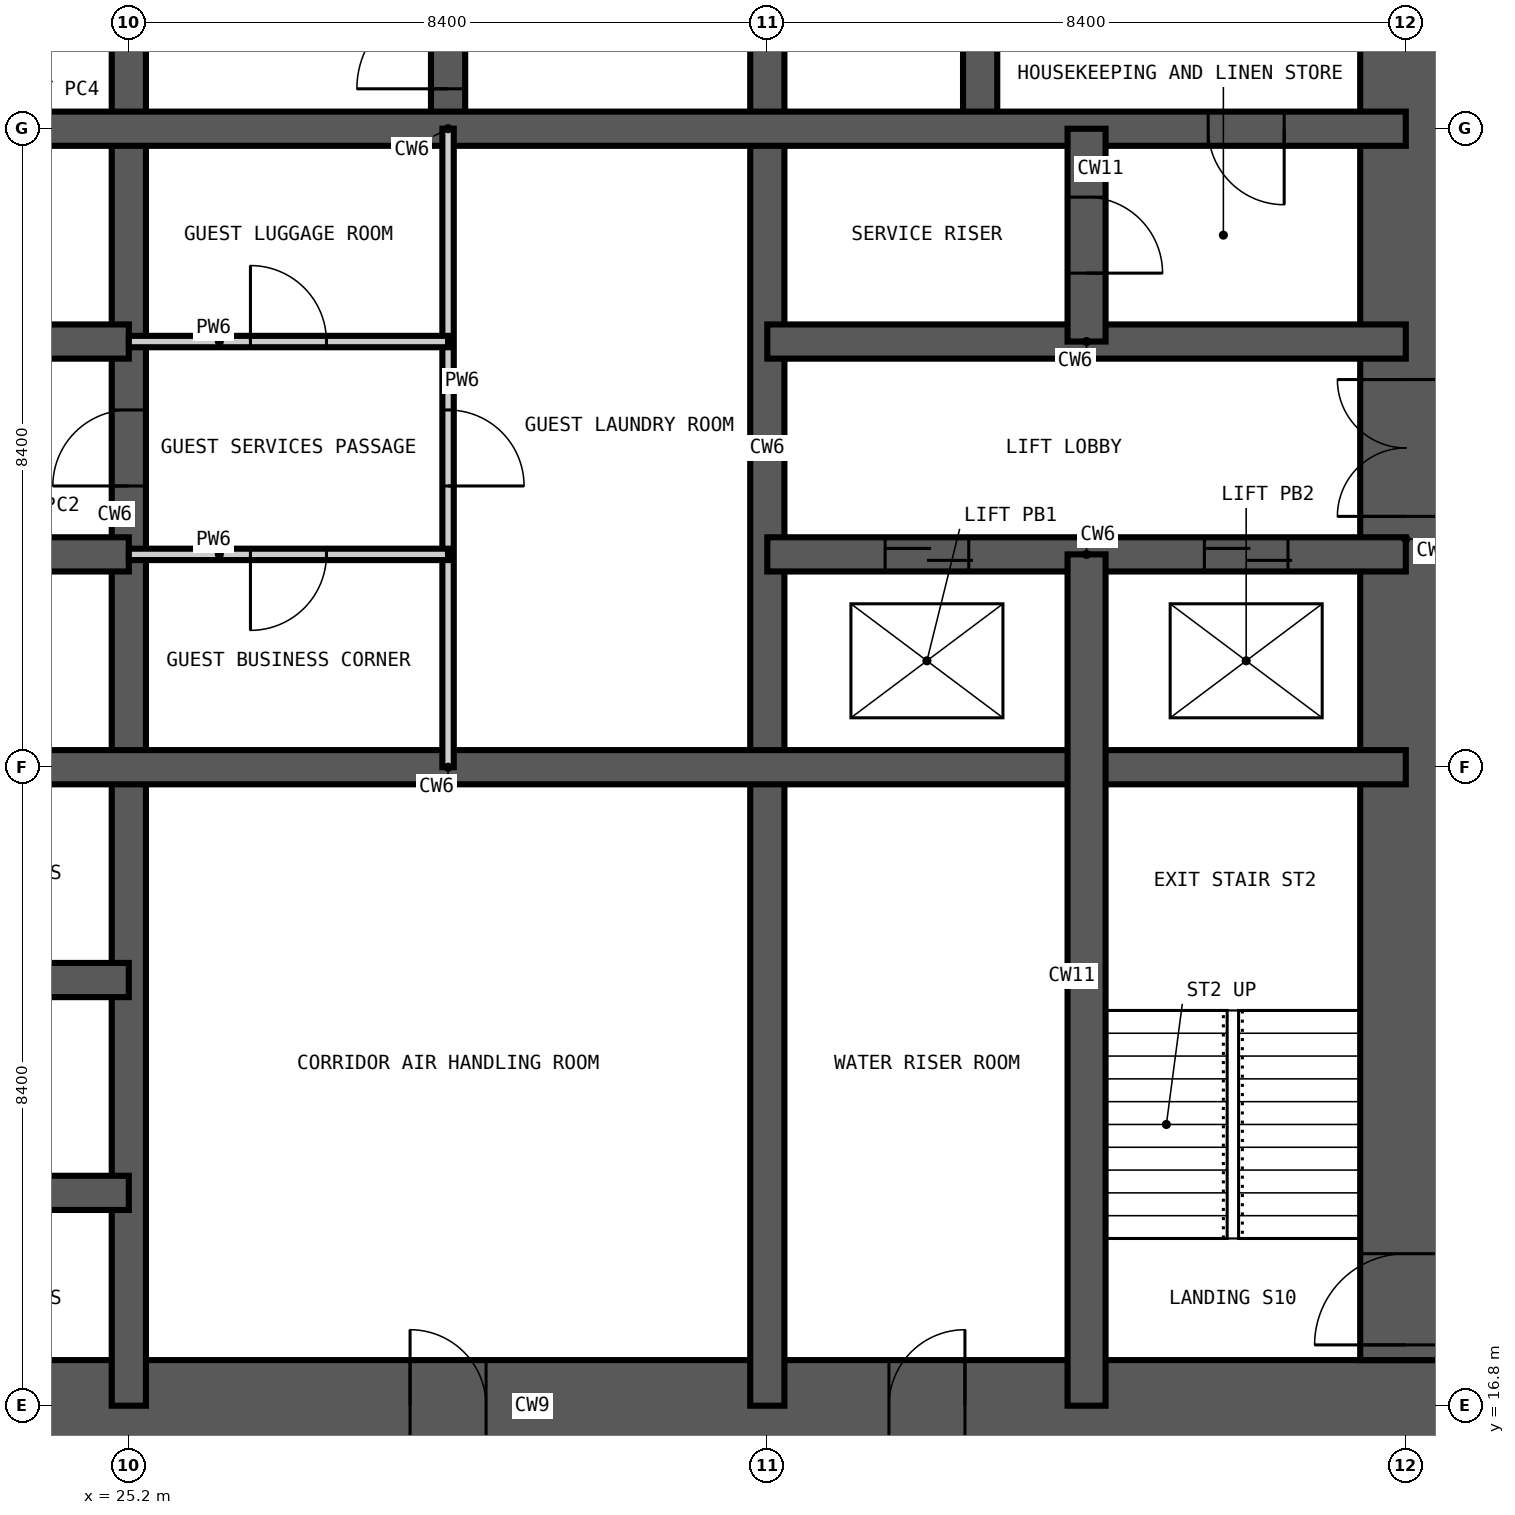
"""IFC4 building model, lengths in metres.
Left out: names, types, materials, properties, quantities, classifications, styles, units other than length and angle.
Written with IfcOpenShell. Run it as: python <this file> out.ifc"""

import sys

from ifc_helpers import new_model, si_unit, direction, frame, frame_2d, origin, place, context, subcontext, project, spatial, rectangle, extrude, element, fill, save


model = new_model("IFC4")
c1 = context("Model", 3, precision=1e-05, world=origin(), true_north=direction((0.0, 1.0)))
c2 = subcontext(c1, "Body", "Model", "MODEL_VIEW")
j1 = project(units=[si_unit("LENGTHUNIT", "METRE"), si_unit("PLANEANGLEUNIT", "RADIAN")], contexts=[c1])
p1 = place(None, origin())
s1 = spatial("IfcSite", under=j1, at=p1, CompositionType="ELEMENT")
p2 = place(p1, origin())
s2 = spatial("IfcBuilding", under=s1, at=p2, CompositionType="ELEMENT")
p3 = place(p2, frame((0.0, 0.0, 97.2)))
s3 = spatial("IfcBuildingStorey", under=s2, at=p3, CompositionType="ELEMENT", Elevation=97.2)
p4 = place(p3, frame((16.2, 16.8, -0.35), z_axis=(0.0, 0.0, 1.0), x_axis=(1.0, 0.0, 0.0)))
e1 = element("IfcWall", 1, at=p4, inside=s3, PredefinedType="SHEAR", context=c2, shape_type="SweptSolid", body=[
    extrude(rectangle(XDim=26.4, YDim=1.2, at=frame_2d((13.2, 0.0))), origin(), (0.0, 0.0, 1.0), 3.6),
])
p5 = place(p4, frame((12.7, 0.0, 0.35)))
e2 = element("IfcOpeningElement", 2, at=p5, cuts=e1, PredefinedType="OPENING", context=c2, shape_type="SweptSolid", body=[
    extrude(rectangle(XDim=1.0, YDim=2.1, at=frame_2d((0.5, 1.05))), frame((0.0, 0.61, 0.0), z_axis=(0.0, -1.0, 0.0), x_axis=(1.0, 0.0, 0.0)), (0.0, 0.0, 1.0), 1.22),
])
p6 = place(p4, frame((19.0, 0.0, 0.35)))
e3 = element("IfcOpeningElement", 3, at=p6, cuts=e1, PredefinedType="OPENING", context=c2, shape_type="SweptSolid", body=[
    extrude(rectangle(XDim=1.0, YDim=2.1, at=frame_2d((0.5, 1.05))), frame((0.0, 0.61, 0.0), z_axis=(0.0, -1.0, 0.0), x_axis=(1.0, 0.0, 0.0)), (0.0, 0.0, 1.0), 1.22),
])
p7 = place(p3, frame((42.0, 17.4, -0.35), z_axis=(0.0, 0.0, 1.0), x_axis=(0.0, 1.0, 0.0)))
e4 = element("IfcWall", 4, at=p7, inside=s3, PredefinedType="SHEAR", context=c2, shape_type="SweptSolid", body=[
    extrude(rectangle(XDim=24.0, YDim=1.2, at=frame_2d((12.0, 0.0))), origin(), (0.0, 0.0, 1.0), 3.6),
])
p8 = place(p7, frame((0.2, 0.0, 0.35)))
e5 = element("IfcOpeningElement", 5, at=p8, cuts=e4, PredefinedType="OPENING", context=c2, shape_type="SweptSolid", body=[
    extrude(rectangle(XDim=1.2, YDim=2.2, at=frame_2d((0.6, 1.1))), frame((0.0, 0.61, 0.0), z_axis=(0.0, -1.0, 0.0), x_axis=(1.0, 0.0, 0.0)), (0.0, 0.0, 1.0), 1.22),
])
p9 = place(p7, frame((11.1, 0.0, 0.35)))
e6 = element("IfcOpeningElement", 6, at=p9, cuts=e4, PredefinedType="OPENING", context=c2, shape_type="SweptSolid", body=[
    extrude(rectangle(XDim=1.8, YDim=2.2, at=frame_2d((0.9, 1.1))), frame((0.0, 0.61, 0.0), z_axis=(0.0, -1.0, 0.0), x_axis=(1.0, 0.0, 0.0)), (0.0, 0.0, 1.0), 1.22),
])
p10 = place(p7, frame((19.9, 0.0, 0.35)))
e7 = element("IfcOpeningElement", 7, at=p10, cuts=e4, PredefinedType="OPENING", context=c2, shape_type="SweptSolid", body=[
    extrude(rectangle(XDim=1.0, YDim=2.1, at=frame_2d((0.5, 1.05))), frame((0.0, 0.61, 0.0), z_axis=(0.0, -1.0, 0.0), x_axis=(1.0, 0.0, 0.0)), (0.0, 0.0, 1.0), 1.22),
])
p11 = place(p3, frame((25.2, 16.8, -0.35), z_axis=(0.0, 0.0, 1.0), x_axis=(0.0, 1.0, 0.0)))
e8 = element("IfcWall", 8, at=p11, inside=s3, PredefinedType="SHEAR", context=c2, shape_type="SweptSolid", body=[
    extrude(rectangle(XDim=25.2, YDim=0.45, at=frame_2d((12.6, 0.0))), origin(), (0.0, 0.0, 1.0), 3.6),
])
p12 = place(p11, frame((12.1, 0.0, 0.35)))
e9 = element("IfcOpeningElement", 9, at=p12, cuts=e8, PredefinedType="OPENING", context=c2, shape_type="SweptSolid", body=[
    extrude(rectangle(XDim=1.0, YDim=2.1, at=frame_2d((0.5, 1.05))), frame((0.0, 0.235, 0.0), z_axis=(0.0, -1.0, 0.0), x_axis=(1.0, 0.0, 0.0)), (0.0, 0.0, 1.0), 0.47),
])
p13 = place(p3, frame((29.4, 33.6, -0.35), z_axis=(0.0, 0.0, 1.0), x_axis=(0.0, 1.0, 0.0)))
e10 = element("IfcWall", 10, at=p13, inside=s3, PredefinedType="SHEAR", context=c2, shape_type="SweptSolid", body=[
    extrude(rectangle(XDim=8.4, YDim=0.45, at=frame_2d((4.2, 0.0))), origin(), (0.0, 0.0, 1.0), 3.6),
])
p14 = place(p13, frame((0.525, 0.0, 0.35)))
e11 = element("IfcOpeningElement", 11, at=p14, cuts=e10, PredefinedType="OPENING", context=c2, shape_type="SweptSolid", body=[
    extrude(rectangle(XDim=1.2, YDim=2.2, at=frame_2d((0.6, 1.1))), frame((0.0, 0.235, 0.0), z_axis=(0.0, -1.0, 0.0), x_axis=(1.0, 0.0, 0.0)), (0.0, 0.0, 1.0), 0.47),
])
p15 = place(p3, frame((33.6, 16.8, -0.35), z_axis=(0.0, 0.0, 1.0), x_axis=(0.0, 1.0, 0.0)))
e12 = element("IfcWall", 12, at=p15, inside=s3, PredefinedType="SHEAR", context=c2, shape_type="SweptSolid", body=[
    extrude(rectangle(XDim=25.2, YDim=0.45, at=frame_2d((12.6, 0.0))), origin(), (0.0, 0.0, 1.0), 3.6),
])
p16 = place(p15, frame((22.5, 0.0, 0.35)))
e13 = element("IfcOpeningElement", 13, at=p16, cuts=e12, PredefinedType="OPENING", context=c2, shape_type="SweptSolid", body=[
    extrude(rectangle(XDim=1.2, YDim=2.2, at=frame_2d((0.6, 1.1))), frame((0.0, 0.235, 0.0), z_axis=(0.0, -1.0, 0.0), x_axis=(1.0, 0.0, 0.0)), (0.0, 0.0, 1.0), 0.47),
])
p17 = place(p15, frame((18.3, 0.0, 0.35)))
e14 = element("IfcOpeningElement", 14, at=p17, cuts=e12, PredefinedType="OPENING", context=c2, shape_type="SweptSolid", body=[
    extrude(rectangle(XDim=1.2, YDim=2.2, at=frame_2d((0.6, 1.1))), frame((0.0, 0.235, 0.0), z_axis=(0.0, -1.0, 0.0), x_axis=(1.0, 0.0, 0.0)), (0.0, 0.0, 1.0), 0.47),
])
for number, where, z_axis, x_axis in (
    (15, (36.4, 33.6, -0.35), (0.0, 0.0, 1.0), (0.0, 1.0, 0.0)),
    (16, (16.8, 19.6, -0.35), (0.0, 0.0, 1.0), (1.0, 0.0, 0.0)),
    (17, (16.8, 22.4, -0.35), (0.0, 0.0, 1.0), (1.0, 0.0, 0.0)),
):
    element("IfcWall", number, at=place(p3, frame(where, z_axis=z_axis, x_axis=x_axis)), inside=s3, PredefinedType="SHEAR", context=c2, shape_type="SweptSolid", body=[
        extrude(rectangle(XDim=8.4, YDim=0.45, at=frame_2d((4.2, 0.0))), origin(), (0.0, 0.0, 1.0), 3.6),
    ])
p18 = place(p3, frame((16.8, 25.2, -0.35), z_axis=(0.0, 0.0, 1.0), x_axis=(1.0, 0.0, 0.0)))
e18 = element("IfcWall", 18, at=p18, inside=s3, PredefinedType="SHEAR", context=c2, shape_type="SweptSolid", body=[
    extrude(rectangle(XDim=25.2, YDim=0.45, at=frame_2d((12.6, 0.0))), origin(), (0.0, 0.0, 1.0), 3.6),
])
p19 = place(p3, frame((16.8, 28.0, -0.35), z_axis=(0.0, 0.0, 1.0), x_axis=(1.0, 0.0, 0.0)))
e19 = element("IfcWall", 19, at=p19, inside=s3, PredefinedType="SHEAR", context=c2, shape_type="SweptSolid", body=[
    extrude(rectangle(XDim=8.4, YDim=0.45, at=frame_2d((4.2, 0.0))), origin(), (0.0, 0.0, 1.0), 3.6),
])
p20 = place(p19, frame((1.55, 0.0, 0.35)))
e20 = element("IfcOpeningElement", 20, at=p20, cuts=e19, PredefinedType="OPENING", context=c2, shape_type="SweptSolid", body=[
    extrude(rectangle(XDim=1.1, YDim=2.2, at=frame_2d((0.55, 1.1))), frame((0.0, 0.235, 0.0), z_axis=(0.0, -1.0, 0.0), x_axis=(1.0, 0.0, 0.0)), (0.0, 0.0, 1.0), 0.47),
])
p21 = place(p19, frame((5.75, 0.0, 0.35)))
e21 = element("IfcOpeningElement", 21, at=p21, cuts=e19, PredefinedType="OPENING", context=c2, shape_type="SweptSolid", body=[
    extrude(rectangle(XDim=1.1, YDim=2.2, at=frame_2d((0.55, 1.1))), frame((0.0, 0.235, 0.0), z_axis=(0.0, -1.0, 0.0), x_axis=(1.0, 0.0, 0.0)), (0.0, 0.0, 1.0), 0.47),
])
p22 = place(p3, frame((33.6, 28.0, -0.35), z_axis=(0.0, 0.0, 1.0), x_axis=(1.0, 0.0, 0.0)))
e22 = element("IfcWall", 22, at=p22, inside=s3, PredefinedType="SHEAR", context=c2, shape_type="SweptSolid", body=[
    extrude(rectangle(XDim=8.4, YDim=0.45, at=frame_2d((4.2, 0.0))), origin(), (0.0, 0.0, 1.0), 3.6),
])
p23 = place(p22, frame((1.55, 0.0, 0.35)))
e23 = element("IfcOpeningElement", 23, at=p23, cuts=e22, PredefinedType="OPENING", context=c2, shape_type="SweptSolid", body=[
    extrude(rectangle(XDim=1.1, YDim=2.2, at=frame_2d((0.55, 1.1))), frame((0.0, 0.235, 0.0), z_axis=(0.0, -1.0, 0.0), x_axis=(1.0, 0.0, 0.0)), (0.0, 0.0, 1.0), 0.47),
])
p24 = place(p22, frame((5.75, 0.0, 0.35)))
e24 = element("IfcOpeningElement", 24, at=p24, cuts=e22, PredefinedType="OPENING", context=c2, shape_type="SweptSolid", body=[
    extrude(rectangle(XDim=1.1, YDim=2.2, at=frame_2d((0.55, 1.1))), frame((0.0, 0.235, 0.0), z_axis=(0.0, -1.0, 0.0), x_axis=(1.0, 0.0, 0.0)), (0.0, 0.0, 1.0), 0.47),
])
p25 = place(p3, frame((16.8, 30.8, -0.35), z_axis=(0.0, 0.0, 1.0), x_axis=(1.0, 0.0, 0.0)))
e25 = element("IfcWall", 25, at=p25, inside=s3, PredefinedType="SHEAR", context=c2, shape_type="SweptSolid", body=[
    extrude(rectangle(XDim=8.4, YDim=0.45, at=frame_2d((4.2, 0.0))), origin(), (0.0, 0.0, 1.0), 3.6),
])
p26 = place(p25, frame((1.55, 0.0, 0.35)))
e26 = element("IfcOpeningElement", 26, at=p26, cuts=e25, PredefinedType="OPENING", context=c2, shape_type="SweptSolid", body=[
    extrude(rectangle(XDim=1.1, YDim=2.2, at=frame_2d((0.55, 1.1))), frame((0.0, 0.235, 0.0), z_axis=(0.0, -1.0, 0.0), x_axis=(1.0, 0.0, 0.0)), (0.0, 0.0, 1.0), 0.47),
])
p27 = place(p25, frame((5.75, 0.0, 0.35)))
e27 = element("IfcOpeningElement", 27, at=p27, cuts=e25, PredefinedType="OPENING", context=c2, shape_type="SweptSolid", body=[
    extrude(rectangle(XDim=1.1, YDim=2.2, at=frame_2d((0.55, 1.1))), frame((0.0, 0.235, 0.0), z_axis=(0.0, -1.0, 0.0), x_axis=(1.0, 0.0, 0.0)), (0.0, 0.0, 1.0), 0.47),
])
p28 = place(p3, frame((33.6, 30.8, -0.35), z_axis=(0.0, 0.0, 1.0), x_axis=(1.0, 0.0, 0.0)))
e28 = element("IfcWall", 28, at=p28, inside=s3, PredefinedType="SHEAR", context=c2, shape_type="SweptSolid", body=[
    extrude(rectangle(XDim=8.4, YDim=0.45, at=frame_2d((4.2, 0.0))), origin(), (0.0, 0.0, 1.0), 3.6),
])
p29 = place(p3, frame((16.8, 33.6, -0.35), z_axis=(0.0, 0.0, 1.0), x_axis=(1.0, 0.0, 0.0)))
e29 = element("IfcWall", 29, at=p29, inside=s3, PredefinedType="SHEAR", context=c2, shape_type="SweptSolid", body=[
    extrude(rectangle(XDim=25.2, YDim=0.45, at=frame_2d((12.6, 0.0))), origin(), (0.0, 0.0, 1.0), 3.6),
])
p30 = place(p29, frame((22.6, 0.0, 0.35)))
e30 = element("IfcOpeningElement", 30, at=p30, cuts=e29, PredefinedType="OPENING", context=c2, shape_type="SweptSolid", body=[
    extrude(rectangle(XDim=1.0, YDim=2.1, at=frame_2d((0.5, 1.05))), frame((0.0, 0.235, 0.0), z_axis=(0.0, -1.0, 0.0), x_axis=(1.0, 0.0, 0.0)), (0.0, 0.0, 1.0), 0.47),
])
p31 = place(p3, frame((37.8, 16.8, -0.35), z_axis=(0.0, 0.0, 1.0), x_axis=(0.0, 1.0, 0.0)))
e31 = element("IfcWall", 31, at=p31, inside=s3, PredefinedType="SHEAR", context=c2, shape_type="SweptSolid", body=[
    extrude(rectangle(XDim=11.2, YDim=0.5, at=frame_2d((5.6, 0.0))), origin(), (0.0, 0.0, 1.0), 3.6),
])
p32 = place(p3, frame((37.8, 30.8, -0.35), z_axis=(0.0, 0.0, 1.0), x_axis=(0.0, 1.0, 0.0)))
e32 = element("IfcWall", 32, at=p32, inside=s3, PredefinedType="SHEAR", context=c2, shape_type="SweptSolid", body=[
    extrude(rectangle(XDim=2.8, YDim=0.5, at=frame_2d((1.4, 0.0))), origin(), (0.0, 0.0, 1.0), 3.6),
])
p33 = place(p32, frame((0.9, 0.0, 0.35)))
e33 = element("IfcOpeningElement", 33, at=p33, cuts=e32, PredefinedType="OPENING", context=c2, shape_type="SweptSolid", body=[
    extrude(rectangle(XDim=1.0, YDim=2.1, at=frame_2d((0.5, 1.05))), frame((0.0, 0.26, 0.0), z_axis=(0.0, -1.0, 0.0), x_axis=(1.0, 0.0, 0.0)), (0.0, 0.0, 1.0), 0.52),
])
p34 = place(p3, frame((29.4, 25.2, 0.0), z_axis=(0.0, 0.0, 1.0), x_axis=(0.0, 1.0, 0.0)))
e34 = element("IfcWall", 34, at=p34, inside=s3, PredefinedType="PARTITIONING", context=c2, shape_type="SweptSolid", body=[
    extrude(rectangle(XDim=8.4, YDim=0.15, at=frame_2d((4.2, 0.0))), origin(), (0.0, 0.0, 1.0), 3.25),
])
p35 = place(p34, frame((3.7, 0.0, 0.0)))
e35 = element("IfcOpeningElement", 35, at=p35, cuts=e34, PredefinedType="OPENING", context=c2, shape_type="SweptSolid", body=[
    extrude(rectangle(XDim=1.0, YDim=2.1, at=frame_2d((0.5, 1.05))), frame((0.0, 0.085, 0.0), z_axis=(0.0, -1.0, 0.0), x_axis=(1.0, 0.0, 0.0)), (0.0, 0.0, 1.0), 0.17),
])
p36 = place(p3, frame((25.2, 28.0, 0.0), z_axis=(0.0, 0.0, 1.0), x_axis=(1.0, 0.0, 0.0)))
e36 = element("IfcWall", 36, at=p36, inside=s3, PredefinedType="PARTITIONING", context=c2, shape_type="SweptSolid", body=[
    extrude(rectangle(XDim=4.2, YDim=0.15, at=frame_2d((2.1, 0.0))), origin(), (0.0, 0.0, 1.0), 3.25),
])
p37 = place(p36, frame((1.6, 0.0, 0.0)))
e37 = element("IfcOpeningElement", 37, at=p37, cuts=e36, PredefinedType="OPENING", context=c2, shape_type="SweptSolid", body=[
    extrude(rectangle(XDim=1.0, YDim=2.1, at=frame_2d((0.5, 1.05))), frame((0.0, 0.085, 0.0), z_axis=(0.0, -1.0, 0.0), x_axis=(1.0, 0.0, 0.0)), (0.0, 0.0, 1.0), 0.17),
])
p38 = place(p3, frame((25.2, 30.8, 0.0), z_axis=(0.0, 0.0, 1.0), x_axis=(1.0, 0.0, 0.0)))
e38 = element("IfcWall", 38, at=p38, inside=s3, PredefinedType="PARTITIONING", context=c2, shape_type="SweptSolid", body=[
    extrude(rectangle(XDim=4.2, YDim=0.15, at=frame_2d((2.1, 0.0))), origin(), (0.0, 0.0, 1.0), 3.25),
])
p39 = place(p38, frame((1.6, 0.0, 0.0)))
e39 = element("IfcOpeningElement", 39, at=p39, cuts=e38, PredefinedType="OPENING", context=c2, shape_type="SweptSolid", body=[
    extrude(rectangle(XDim=1.0, YDim=2.1, at=frame_2d((0.5, 1.05))), frame((0.0, 0.085, 0.0), z_axis=(0.0, -1.0, 0.0), x_axis=(1.0, 0.0, 0.0)), (0.0, 0.0, 1.0), 0.17),
])
p40 = place(p14, origin())
e40 = element("IfcDoor", 40, at=p40, inside=s3, OperationType="SINGLE_SWING_LEFT", PredefinedType="DOOR", context=c2, shape_type="SweptSolid", body=[
    extrude(rectangle(XDim=1.2, YDim=2.2, at=frame_2d((0.6, 1.1))), frame((0.0, 0.025, 0.0), z_axis=(0.0, -1.0, 0.0), x_axis=(1.0, 0.0, 0.0)), (0.0, 0.0, 1.0), 0.05),
])
fill(e11, e40)
p41 = place(p8, origin())
e41 = element("IfcDoor", 41, at=p41, inside=s3, OperationType="SINGLE_SWING_LEFT", PredefinedType="DOOR", context=c2, shape_type="SweptSolid", body=[
    extrude(rectangle(XDim=1.2, YDim=2.2, at=frame_2d((0.6, 1.1))), frame((0.0, 0.025, 0.0), z_axis=(0.0, -1.0, 0.0), x_axis=(1.0, 0.0, 0.0)), (0.0, 0.0, 1.0), 0.05),
])
fill(e5, e41)
p42 = place(p23, origin())
e42 = element("IfcDoor", 42, at=p42, inside=s3, OperationType="DOUBLE_DOOR_SLIDING", PredefinedType="DOOR", context=c2, shape_type="SweptSolid", body=[
    extrude(rectangle(XDim=1.1, YDim=2.2, at=frame_2d((0.55, 1.1))), frame((0.0, 0.025, 0.0), z_axis=(0.0, -1.0, 0.0), x_axis=(1.0, 0.0, 0.0)), (0.0, 0.0, 1.0), 0.05),
])
fill(e23, e42)
p43 = place(p24, origin())
e43 = element("IfcDoor", 43, at=p43, inside=s3, OperationType="DOUBLE_DOOR_SLIDING", PredefinedType="DOOR", context=c2, shape_type="SweptSolid", body=[
    extrude(rectangle(XDim=1.1, YDim=2.2, at=frame_2d((0.55, 1.1))), frame((0.0, 0.025, 0.0), z_axis=(0.0, -1.0, 0.0), x_axis=(1.0, 0.0, 0.0)), (0.0, 0.0, 1.0), 0.05),
])
fill(e24, e43)
p44 = place(p12, origin())
e44 = element("IfcDoor", 44, at=p44, inside=s3, OperationType="SINGLE_SWING_LEFT", PredefinedType="DOOR", context=c2, shape_type="SweptSolid", body=[
    extrude(rectangle(XDim=1.0, YDim=2.1, at=frame_2d((0.5, 1.05))), frame((0.0, 0.025, 0.0), z_axis=(0.0, -1.0, 0.0), x_axis=(1.0, 0.0, 0.0)), (0.0, 0.0, 1.0), 0.05),
])
fill(e9, e44)
p45 = place(p37, frame((1.0, 0.0, 0.0), z_axis=(0.0, 0.0, 1.0), x_axis=(-1.0, 0.0, 0.0)))
e45 = element("IfcDoor", 45, at=p45, inside=s3, OperationType="SINGLE_SWING_RIGHT", PredefinedType="DOOR", context=c2, shape_type="SweptSolid", body=[
    extrude(rectangle(XDim=1.0, YDim=2.1, at=frame_2d((0.5, 1.05))), frame((0.0, 0.025, 0.0), z_axis=(0.0, -1.0, 0.0), x_axis=(1.0, 0.0, 0.0)), (0.0, 0.0, 1.0), 0.05),
])
fill(e37, e45)
p46 = place(p39, origin())
e46 = element("IfcDoor", 46, at=p46, inside=s3, OperationType="SINGLE_SWING_LEFT", PredefinedType="DOOR", context=c2, shape_type="SweptSolid", body=[
    extrude(rectangle(XDim=1.0, YDim=2.1, at=frame_2d((0.5, 1.05))), frame((0.0, 0.025, 0.0), z_axis=(0.0, -1.0, 0.0), x_axis=(1.0, 0.0, 0.0)), (0.0, 0.0, 1.0), 0.05),
])
fill(e39, e46)
p47 = place(p35, frame((1.0, 0.0, 0.0), z_axis=(0.0, 0.0, 1.0), x_axis=(-1.0, 0.0, 0.0)))
e47 = element("IfcDoor", 47, at=p47, inside=s3, OperationType="SINGLE_SWING_RIGHT", PredefinedType="DOOR", context=c2, shape_type="SweptSolid", body=[
    extrude(rectangle(XDim=1.0, YDim=2.1, at=frame_2d((0.5, 1.05))), frame((0.0, 0.025, 0.0), z_axis=(0.0, -1.0, 0.0), x_axis=(1.0, 0.0, 0.0)), (0.0, 0.0, 1.0), 0.05),
])
fill(e35, e47)
p48 = place(p33, frame((1.0, 0.0, 0.0), z_axis=(0.0, 0.0, 1.0), x_axis=(-1.0, 0.0, 0.0)))
e48 = element("IfcDoor", 48, at=p48, inside=s3, OperationType="SINGLE_SWING_RIGHT", PredefinedType="DOOR", context=c2, shape_type="SweptSolid", body=[
    extrude(rectangle(XDim=1.0, YDim=2.1, at=frame_2d((0.5, 1.05))), frame((0.0, 0.025, 0.0), z_axis=(0.0, -1.0, 0.0), x_axis=(1.0, 0.0, 0.0)), (0.0, 0.0, 1.0), 0.05),
])
fill(e33, e48)
p49 = place(p30, frame((1.0, 0.0, 0.0), z_axis=(0.0, 0.0, 1.0), x_axis=(-1.0, 0.0, 0.0)))
e49 = element("IfcDoor", 49, at=p49, inside=s3, OperationType="SINGLE_SWING_LEFT", PredefinedType="DOOR", context=c2, shape_type="SweptSolid", body=[
    extrude(rectangle(XDim=1.0, YDim=2.1, at=frame_2d((0.5, 1.05))), frame((0.0, 0.025, 0.0), z_axis=(0.0, -1.0, 0.0), x_axis=(1.0, 0.0, 0.0)), (0.0, 0.0, 1.0), 0.05),
])
fill(e30, e49)
p50 = place(p9, origin())
e50 = element("IfcDoor", 50, at=p50, inside=s3, OperationType="DOUBLE_DOOR_DOUBLE_SWING", PredefinedType="DOOR", context=c2, shape_type="SweptSolid", body=[
    extrude(rectangle(XDim=1.8, YDim=2.2, at=frame_2d((0.9, 1.1))), frame((0.0, 0.025, 0.0), z_axis=(0.0, -1.0, 0.0), x_axis=(1.0, 0.0, 0.0)), (0.0, 0.0, 1.0), 0.05),
])
fill(e6, e50)
p51 = place(p5, origin())
e51 = element("IfcDoor", 51, at=p51, inside=s3, OperationType="SINGLE_SWING_LEFT", PredefinedType="DOOR", context=c2, shape_type="SweptSolid", body=[
    extrude(rectangle(XDim=1.0, YDim=2.1, at=frame_2d((0.5, 1.05))), frame((0.0, 0.025, 0.0), z_axis=(0.0, -1.0, 0.0), x_axis=(1.0, 0.0, 0.0)), (0.0, 0.0, 1.0), 0.05),
])
fill(e2, e51)
p52 = place(p6, origin())
e52 = element("IfcDoor", 52, at=p52, inside=s3, OperationType="SINGLE_SWING_RIGHT", PredefinedType="DOOR", context=c2, shape_type="SweptSolid", body=[
    extrude(rectangle(XDim=1.0, YDim=2.1, at=frame_2d((0.5, 1.05))), frame((0.0, 0.025, 0.0), z_axis=(0.0, -1.0, 0.0), x_axis=(1.0, 0.0, 0.0)), (0.0, 0.0, 1.0), 0.05),
])
fill(e3, e52)
save(model, sys.argv[1])
